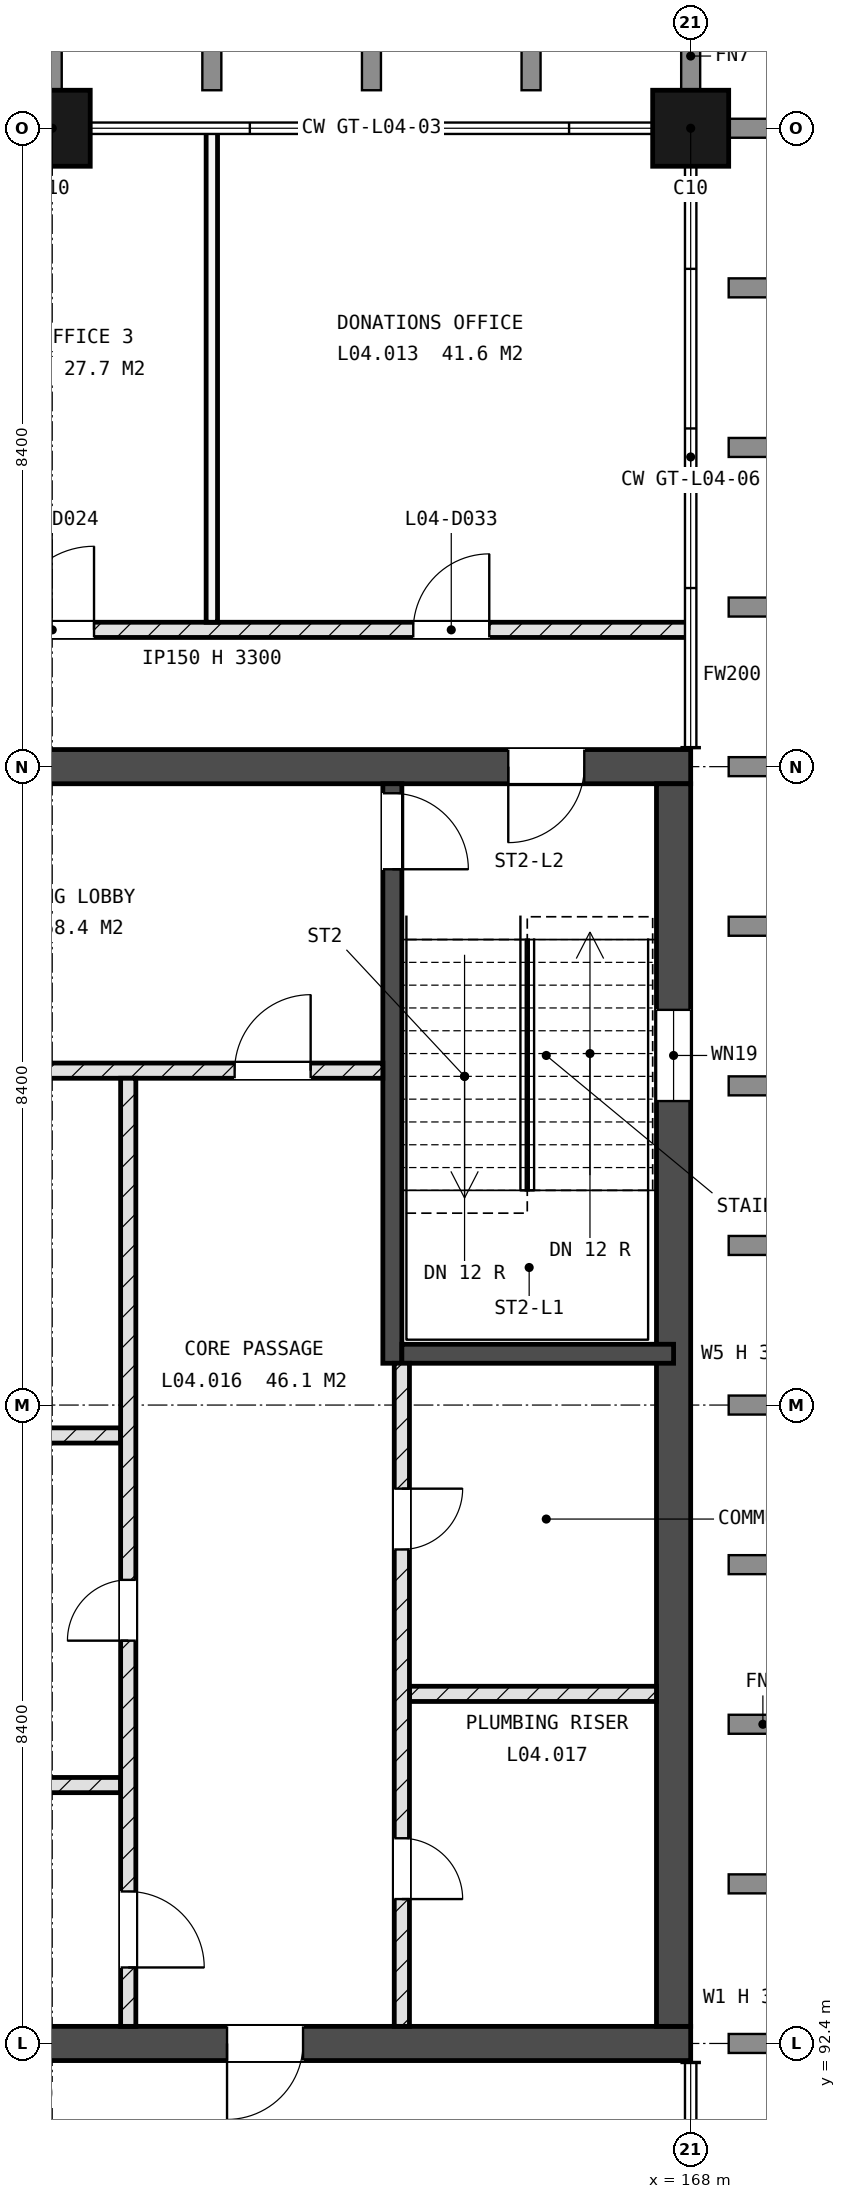
"""IFC4 building model, lengths in metres.
Left out: names, types, materials, properties, quantities, classifications, styles, units other than length and angle.
Written with IfcOpenShell. Run it as: python <this file> out.ifc"""

import sys

from ifc_helpers import new_model, si_unit, direction, frame, frame_2d, origin, origin_2d, place, context, subcontext, project, spatial, rectangle, extrude, element, fill, save


model = new_model("IFC4")
c1 = context("Model", 3, precision=1e-05, world=origin(), true_north=direction((0.0, 1.0)))
c2 = subcontext(c1, "Body", "Model", "MODEL_VIEW")
j1 = project(units=[si_unit("LENGTHUNIT", "METRE"), si_unit("PLANEANGLEUNIT", "RADIAN")], contexts=[c1])
p1 = place(None, origin())
s1 = spatial("IfcSite", under=j1, at=p1, CompositionType="ELEMENT")
p2 = place(p1, origin())
s2 = spatial("IfcBuilding", under=s1, at=p2, CompositionType="ELEMENT")
p3 = place(p2, frame((0.0, 0.0, 18.0)))
s3 = spatial("IfcBuildingStorey", under=s2, at=p3, CompositionType="ELEMENT", Elevation=18.0)
for number, where, z_axis, x_axis in (
    (1, (159.6, 117.6, -0.25), (0.0, 0.0, 1.0), (1.0, 0.0, 0.0)),
    (2, (168.0, 117.6, -0.25), (0.0, 0.0, 1.0), (1.0, 0.0, 0.0)),
):
    element("IfcColumn", number, at=place(p3, frame(where, z_axis=z_axis, x_axis=x_axis)), inside=s3, PredefinedType="COLUMN", context=c2, shape_type="SweptSolid", body=[
        extrude(rectangle(XDim=1.0, YDim=1.0, at=origin_2d()), origin(), (0.0, 0.0, 1.0), 3.6),
    ])
p4 = place(p3, frame((142.8, 92.4, -0.25), z_axis=(0.0, 0.0, 1.0), x_axis=(1.0, 0.0, 0.0)))
e3 = element("IfcWall", 3, at=p4, inside=s3, PredefinedType="SHEAR", context=c2, shape_type="SweptSolid", body=[
    extrude(rectangle(XDim=25.2, YDim=0.45, at=frame_2d((12.6, 0.0))), origin(), (0.0, 0.0, 1.0), 3.6),
])
p5 = place(p4, frame((1.4, 0.0, 0.25)))
e4 = element("IfcOpeningElement", 4, at=p5, cuts=e3, PredefinedType="OPENING", context=c2, shape_type="SweptSolid", body=[
    extrude(rectangle(XDim=1.0, YDim=2.1, at=frame_2d((0.5, 1.05))), frame((0.0, 0.235, 0.0), z_axis=(0.0, -1.0, 0.0), x_axis=(1.0, 0.0, 0.0)), (0.0, 0.0, 1.0), 0.47),
])
p6 = place(p4, frame((19.1, 0.0, 0.25)))
e5 = element("IfcOpeningElement", 5, at=p6, cuts=e3, PredefinedType="OPENING", context=c2, shape_type="SweptSolid", body=[
    extrude(rectangle(XDim=1.0, YDim=2.1, at=frame_2d((0.5, 1.05))), frame((0.0, 0.235, 0.0), z_axis=(0.0, -1.0, 0.0), x_axis=(1.0, 0.0, 0.0)), (0.0, 0.0, 1.0), 0.47),
])
p7 = place(p4, frame((10.4, 0.0, 0.25)))
e6 = element("IfcOpeningElement", 6, at=p7, cuts=e3, PredefinedType="OPENING", context=c2, shape_type="SweptSolid", body=[
    extrude(rectangle(XDim=1.0, YDim=2.1, at=frame_2d((0.5, 1.05))), frame((0.0, 0.235, 0.0), z_axis=(0.0, -1.0, 0.0), x_axis=(1.0, 0.0, 0.0)), (0.0, 0.0, 1.0), 0.47),
])
p8 = place(p3, frame((142.8, 109.2, -0.25), z_axis=(0.0, 0.0, 1.0), x_axis=(1.0, 0.0, 0.0)))
e7 = element("IfcWall", 7, at=p8, inside=s3, PredefinedType="SHEAR", context=c2, shape_type="SweptSolid", body=[
    extrude(rectangle(XDim=25.2, YDim=0.45, at=frame_2d((12.6, 0.0))), origin(), (0.0, 0.0, 1.0), 3.6),
])
p9 = place(p8, frame((22.8, 0.0, 0.25)))
e8 = element("IfcOpeningElement", 8, at=p9, cuts=e7, PredefinedType="OPENING", context=c2, shape_type="SweptSolid", body=[
    extrude(rectangle(XDim=1.0, YDim=2.1, at=frame_2d((0.5, 1.05))), frame((0.0, 0.235, 0.0), z_axis=(0.0, -1.0, 0.0), x_axis=(1.0, 0.0, 0.0)), (0.0, 0.0, 1.0), 0.47),
])
p10 = place(p8, frame((1.5, 0.0, 0.25)))
e9 = element("IfcOpeningElement", 9, at=p10, cuts=e7, PredefinedType="OPENING", context=c2, shape_type="SweptSolid", body=[
    extrude(rectangle(XDim=0.8, YDim=2.1, at=frame_2d((0.4, 1.05))), frame((0.0, 0.235, 0.0), z_axis=(0.0, -1.0, 0.0), x_axis=(1.0, 0.0, 0.0)), (0.0, 0.0, 1.0), 0.47),
])
p11 = place(p8, frame((13.4, 0.0, 0.25)))
e10 = element("IfcOpeningElement", 10, at=p11, cuts=e7, PredefinedType="OPENING", context=c2, shape_type="SweptSolid", body=[
    extrude(rectangle(XDim=1.0, YDim=2.1, at=frame_2d((0.5, 1.05))), frame((0.0, 0.235, 0.0), z_axis=(0.0, -1.0, 0.0), x_axis=(1.0, 0.0, 0.0)), (0.0, 0.0, 1.0), 0.47),
])
p12 = place(p3, frame((167.775, 92.625, -0.25), z_axis=(0.0, 0.0, 1.0), x_axis=(0.0, 1.0, 0.0)))
e11 = element("IfcWall", 11, at=p12, inside=s3, PredefinedType="SHEAR", context=c2, shape_type="SweptSolid", body=[
    extrude(rectangle(XDim=16.35, YDim=0.45, at=frame_2d((8.175, 0.0))), origin(), (0.0, 0.0, 1.0), 3.6),
])
p13 = place(p12, frame((12.175, 0.0, 1.85)))
e12 = element("IfcOpeningElement", 12, at=p13, cuts=e11, PredefinedType="OPENING", context=c2, shape_type="SweptSolid", body=[
    extrude(rectangle(XDim=1.2, YDim=0.9, at=frame_2d((0.6, 0.45))), frame((0.0, 0.235, 0.0), z_axis=(0.0, -1.0, 0.0), x_axis=(1.0, 0.0, 0.0)), (0.0, 0.0, 1.0), 0.47),
])
p14 = place(p3, frame((164.075, 101.35, -0.25), z_axis=(0.0, 0.0, 1.0), x_axis=(0.0, 1.0, 0.0)))
e13 = element("IfcWall", 13, at=p14, inside=s3, PredefinedType="SHEAR", context=c2, shape_type="SweptSolid", body=[
    extrude(rectangle(XDim=7.625, YDim=0.25, at=frame_2d((3.812, 0.0))), origin(), (0.0, 0.0, 1.0), 3.6),
])
p15 = place(p14, frame((6.5, 0.0, 0.25)))
e14 = element("IfcOpeningElement", 14, at=p15, cuts=e13, PredefinedType="OPENING", context=c2, shape_type="SweptSolid", body=[
    extrude(rectangle(XDim=1.0, YDim=2.1, at=frame_2d((0.5, 1.05))), frame((0.0, 0.135, 0.0), z_axis=(0.0, -1.0, 0.0), x_axis=(1.0, 0.0, 0.0)), (0.0, 0.0, 1.0), 0.27),
])
p16 = place(p3, frame((164.2, 101.475, -0.25), z_axis=(0.0, 0.0, 1.0), x_axis=(1.0, 0.0, 0.0)))
e15 = element("IfcWall", 15, at=p16, inside=s3, PredefinedType="SHEAR", context=c2, shape_type="SweptSolid", body=[
    extrude(rectangle(XDim=3.575, YDim=0.25, at=frame_2d((1.788, 0.0))), origin(), (0.0, 0.0, 1.0), 3.6),
])
p17 = place(p3, frame((158.25, 95.8, 0.0), z_axis=(0.0, 0.0, 1.0), x_axis=(1.0, 0.0, 0.0)))
e16 = element("IfcWall", 16, at=p17, inside=s3, PredefinedType="SOLIDWALL", context=c2, shape_type="SweptSolid", body=[
    extrude(rectangle(XDim=2.25, YDim=0.2, at=frame_2d((1.125, 0.0))), origin(), (0.0, 0.0, 1.0), 3.3),
])
p18 = place(p3, frame((164.3, 97.0, 0.0), z_axis=(0.0, 0.0, 1.0), x_axis=(1.0, 0.0, 0.0)))
e17 = element("IfcWall", 17, at=p18, inside=s3, PredefinedType="SOLIDWALL", context=c2, shape_type="SweptSolid", body=[
    extrude(rectangle(XDim=3.25, YDim=0.2, at=frame_2d((1.625, 0.0))), origin(), (0.0, 0.0, 1.0), 3.3),
])
p19 = place(p3, frame((146.5, 100.4, 0.0), z_axis=(0.0, 0.0, 1.0), x_axis=(1.0, 0.0, 0.0)))
e18 = element("IfcWall", 18, at=p19, inside=s3, PredefinedType="SOLIDWALL", context=c2, shape_type="SweptSolid", body=[
    extrude(rectangle(XDim=14.0, YDim=0.2, at=frame_2d((7.0, 0.0))), origin(), (0.0, 0.0, 1.0), 3.3),
])
p20 = place(p3, frame((143.25, 105.2, 0.0), z_axis=(0.0, 0.0, 1.0), x_axis=(1.0, 0.0, 0.0)))
e19 = element("IfcWall", 19, at=p20, inside=s3, PredefinedType="SOLIDWALL", context=c2, shape_type="SweptSolid", body=[
    extrude(rectangle(XDim=20.7, YDim=0.2, at=frame_2d((10.35, 0.0))), origin(), (0.0, 0.0, 1.0), 3.3),
])
p21 = place(p20, frame((11.45, 0.0, 0.0)))
e20 = element("IfcOpeningElement", 20, at=p21, cuts=e19, PredefinedType="OPENING", context=c2, shape_type="SweptSolid", body=[
    extrude(rectangle(XDim=0.8, YDim=2.1, at=frame_2d((0.4, 1.05))), frame((0.0, 0.11, 0.0), z_axis=(0.0, -1.0, 0.0), x_axis=(1.0, 0.0, 0.0)), (0.0, 0.0, 1.0), 0.22),
])
p22 = place(p20, frame((18.75, 0.0, 0.0)))
e21 = element("IfcOpeningElement", 21, at=p22, cuts=e19, PredefinedType="OPENING", context=c2, shape_type="SweptSolid", body=[
    extrude(rectangle(XDim=1.0, YDim=2.1, at=frame_2d((0.5, 1.05))), frame((0.0, 0.11, 0.0), z_axis=(0.0, -1.0, 0.0), x_axis=(1.0, 0.0, 0.0)), (0.0, 0.0, 1.0), 0.22),
])
p23 = place(p3, frame((142.8, 111.0, 0.0), z_axis=(0.0, 0.0, 1.0), x_axis=(1.0, 0.0, 0.0)))
e22 = element("IfcWall", 22, at=p23, inside=s3, PredefinedType="SOLIDWALL", context=c2, shape_type="SweptSolid", body=[
    extrude(rectangle(XDim=25.2, YDim=0.2, at=frame_2d((12.6, 0.0))), origin(), (0.0, 0.0, 1.0), 3.3),
])
p24 = place(p23, frame((1.55, 0.0, 0.0)))
e23 = element("IfcOpeningElement", 23, at=p24, cuts=e22, PredefinedType="OPENING", context=c2, shape_type="SweptSolid", body=[
    extrude(rectangle(XDim=1.1, YDim=2.25, at=frame_2d((0.55, 1.125))), frame((0.0, 0.11, 0.0), z_axis=(0.0, -1.0, 0.0), x_axis=(1.0, 0.0, 0.0)), (0.0, 0.0, 1.0), 0.22),
])
p25 = place(p23, frame((6.85, 0.0, 0.0)))
e24 = element("IfcOpeningElement", 24, at=p25, cuts=e22, PredefinedType="OPENING", context=c2, shape_type="SweptSolid", body=[
    extrude(rectangle(XDim=1.0, YDim=2.1, at=frame_2d((0.5, 1.05))), frame((0.0, 0.11, 0.0), z_axis=(0.0, -1.0, 0.0), x_axis=(1.0, 0.0, 0.0)), (0.0, 0.0, 1.0), 0.22),
])
p26 = place(p23, frame((12.05, 0.0, 0.0)))
e25 = element("IfcOpeningElement", 25, at=p26, cuts=e22, PredefinedType="OPENING", context=c2, shape_type="SweptSolid", body=[
    extrude(rectangle(XDim=1.1, YDim=2.25, at=frame_2d((0.55, 1.125))), frame((0.0, 0.11, 0.0), z_axis=(0.0, -1.0, 0.0), x_axis=(1.0, 0.0, 0.0)), (0.0, 0.0, 1.0), 0.22),
])
p27 = place(p23, frame((16.25, 0.0, 0.0)))
e26 = element("IfcOpeningElement", 26, at=p27, cuts=e22, PredefinedType="OPENING", context=c2, shape_type="SweptSolid", body=[
    extrude(rectangle(XDim=1.1, YDim=2.25, at=frame_2d((0.55, 1.125))), frame((0.0, 0.11, 0.0), z_axis=(0.0, -1.0, 0.0), x_axis=(1.0, 0.0, 0.0)), (0.0, 0.0, 1.0), 0.22),
])
p28 = place(p23, frame((21.55, 0.0, 0.0)))
e27 = element("IfcOpeningElement", 27, at=p28, cuts=e22, PredefinedType="OPENING", context=c2, shape_type="SweptSolid", body=[
    extrude(rectangle(XDim=1.0, YDim=2.1, at=frame_2d((0.5, 1.05))), frame((0.0, 0.11, 0.0), z_axis=(0.0, -1.0, 0.0), x_axis=(1.0, 0.0, 0.0)), (0.0, 0.0, 1.0), 0.22),
])
p29 = place(p3, frame((160.6, 92.625, 0.0), z_axis=(0.0, 0.0, 1.0), x_axis=(0.0, 1.0, 0.0)))
e28 = element("IfcWall", 28, at=p29, inside=s3, PredefinedType="SOLIDWALL", context=c2, shape_type="SweptSolid", body=[
    extrude(rectangle(XDim=12.475, YDim=0.2, at=frame_2d((6.238, 0.0))), origin(), (0.0, 0.0, 1.0), 3.3),
])
p30 = place(p29, frame((5.075, 0.0, 0.0)))
e29 = element("IfcOpeningElement", 29, at=p30, cuts=e28, PredefinedType="OPENING", context=c2, shape_type="SweptSolid", body=[
    extrude(rectangle(XDim=0.8, YDim=2.1, at=frame_2d((0.4, 1.05))), frame((0.0, 0.11, 0.0), z_axis=(0.0, -1.0, 0.0), x_axis=(1.0, 0.0, 0.0)), (0.0, 0.0, 1.0), 0.22),
])
p31 = place(p29, frame((0.775, 0.0, 0.0)))
e30 = element("IfcOpeningElement", 30, at=p31, cuts=e28, PredefinedType="OPENING", context=c2, shape_type="SweptSolid", body=[
    extrude(rectangle(XDim=1.0, YDim=2.1, at=frame_2d((0.5, 1.05))), frame((0.0, 0.11, 0.0), z_axis=(0.0, -1.0, 0.0), x_axis=(1.0, 0.0, 0.0)), (0.0, 0.0, 1.0), 0.22),
])
p32 = place(p3, frame((161.7, 111.1, 0.0), z_axis=(0.0, 0.0, 1.0), x_axis=(0.0, 1.0, 0.0)))
e31 = element("IfcWall", 31, at=p32, inside=s3, PredefinedType="PARTITIONING", context=c2, shape_type="SweptSolid", body=[
    extrude(rectangle(XDim=6.5, YDim=0.15, at=frame_2d((3.25, 0.0))), origin(), (0.0, 0.0, 1.0), 3.3),
])
p33 = place(p3, frame((164.2, 92.625, 0.0), z_axis=(0.0, 0.0, 1.0), x_axis=(0.0, 1.0, 0.0)))
e32 = element("IfcWall", 32, at=p33, inside=s3, PredefinedType="SOLIDWALL", context=c2, shape_type="SweptSolid", body=[
    extrude(rectangle(XDim=8.725, YDim=0.2, at=frame_2d((4.363, 0.0))), origin(), (0.0, 0.0, 1.0), 3.3),
])
p34 = place(p33, frame((1.675, 0.0, 0.0)))
e33 = element("IfcOpeningElement", 33, at=p34, cuts=e32, PredefinedType="OPENING", context=c2, shape_type="SweptSolid", body=[
    extrude(rectangle(XDim=0.8, YDim=2.1, at=frame_2d((0.4, 1.05))), frame((0.0, 0.11, 0.0), z_axis=(0.0, -1.0, 0.0), x_axis=(1.0, 0.0, 0.0)), (0.0, 0.0, 1.0), 0.22),
])
p35 = place(p33, frame((6.275, 0.0, 0.0)))
e34 = element("IfcOpeningElement", 34, at=p35, cuts=e32, PredefinedType="OPENING", context=c2, shape_type="SweptSolid", body=[
    extrude(rectangle(XDim=0.8, YDim=2.1, at=frame_2d((0.4, 1.05))), frame((0.0, 0.11, 0.0), z_axis=(0.0, -1.0, 0.0), x_axis=(1.0, 0.0, 0.0)), (0.0, 0.0, 1.0), 0.22),
])
p36 = place(p13, origin())
e35 = element("IfcWindow", 35, at=p36, inside=s3, PartitioningType="SINGLE_PANEL", PredefinedType="WINDOW", context=c2, shape_type="SweptSolid", body=[
    extrude(rectangle(XDim=1.2, YDim=0.9, at=frame_2d((0.6, 0.45))), frame((0.0, 0.03, 0.0), z_axis=(0.0, -1.0, 0.0), x_axis=(1.0, 0.0, 0.0)), (0.0, 0.0, 1.0), 0.06),
])
fill(e12, e35)
p37 = place(p15, origin())
e36 = element("IfcDoor", 36, at=p37, inside=s3, OperationType="SINGLE_SWING_LEFT", PredefinedType="DOOR", context=c2, shape_type="SweptSolid", body=[
    extrude(rectangle(XDim=1.0, YDim=2.1, at=frame_2d((0.5, 1.05))), frame((0.0, 0.025, 0.0), z_axis=(0.0, -1.0, 0.0), x_axis=(1.0, 0.0, 0.0)), (0.0, 0.0, 1.0), 0.05),
])
fill(e14, e36)
p38 = place(p9, origin())
e37 = element("IfcDoor", 37, at=p38, inside=s3, OperationType="SINGLE_SWING_LEFT", PredefinedType="DOOR", context=c2, shape_type="SweptSolid", body=[
    extrude(rectangle(XDim=1.0, YDim=2.1, at=frame_2d((0.5, 1.05))), frame((0.0, 0.025, 0.0), z_axis=(0.0, -1.0, 0.0), x_axis=(1.0, 0.0, 0.0)), (0.0, 0.0, 1.0), 0.05),
])
fill(e8, e37)
p39 = place(p27, origin())
e38 = element("IfcDoor", 38, at=p39, inside=s3, OperationType="SINGLE_SWING_LEFT", PredefinedType="DOOR", context=c2, shape_type="SweptSolid", body=[
    extrude(rectangle(XDim=1.1, YDim=2.25, at=frame_2d((0.55, 1.125))), frame((0.0, 0.025, 0.0), z_axis=(0.0, -1.0, 0.0), x_axis=(1.0, 0.0, 0.0)), (0.0, 0.0, 1.0), 0.05),
])
fill(e26, e38)
p40 = place(p28, origin())
e39 = element("IfcDoor", 39, at=p40, inside=s3, OperationType="SINGLE_SWING_LEFT", PredefinedType="DOOR", context=c2, shape_type="SweptSolid", body=[
    extrude(rectangle(XDim=1.0, YDim=2.1, at=frame_2d((0.5, 1.05))), frame((0.0, 0.025, 0.0), z_axis=(0.0, -1.0, 0.0), x_axis=(1.0, 0.0, 0.0)), (0.0, 0.0, 1.0), 0.05),
])
fill(e27, e39)
p41 = place(p34, origin())
e40 = element("IfcDoor", 40, at=p41, inside=s3, OperationType="SINGLE_SWING_LEFT", PredefinedType="DOOR", context=c2, shape_type="SweptSolid", body=[
    extrude(rectangle(XDim=0.8, YDim=2.1, at=frame_2d((0.4, 1.05))), frame((0.0, 0.025, 0.0), z_axis=(0.0, -1.0, 0.0), x_axis=(1.0, 0.0, 0.0)), (0.0, 0.0, 1.0), 0.05),
])
fill(e33, e40)
p42 = place(p35, origin())
e41 = element("IfcDoor", 41, at=p42, inside=s3, OperationType="SINGLE_SWING_RIGHT", PredefinedType="DOOR", context=c2, shape_type="SweptSolid", body=[
    extrude(rectangle(XDim=0.8, YDim=2.1, at=frame_2d((0.4, 1.05))), frame((0.0, 0.025, 0.0), z_axis=(0.0, -1.0, 0.0), x_axis=(1.0, 0.0, 0.0)), (0.0, 0.0, 1.0), 0.05),
])
fill(e34, e41)
p43 = place(p30, origin())
e42 = element("IfcDoor", 42, at=p43, inside=s3, OperationType="SINGLE_SWING_RIGHT", PredefinedType="DOOR", context=c2, shape_type="SweptSolid", body=[
    extrude(rectangle(XDim=0.8, YDim=2.1, at=frame_2d((0.4, 1.05))), frame((0.0, 0.025, 0.0), z_axis=(0.0, -1.0, 0.0), x_axis=(1.0, 0.0, 0.0)), (0.0, 0.0, 1.0), 0.05),
])
fill(e29, e42)
p44 = place(p6, origin())
e43 = element("IfcDoor", 43, at=p44, inside=s3, OperationType="SINGLE_SWING_LEFT", PredefinedType="DOOR", context=c2, shape_type="SweptSolid", body=[
    extrude(rectangle(XDim=1.0, YDim=2.1, at=frame_2d((0.5, 1.05))), frame((0.0, 0.025, 0.0), z_axis=(0.0, -1.0, 0.0), x_axis=(1.0, 0.0, 0.0)), (0.0, 0.0, 1.0), 0.05),
])
fill(e5, e43)
p45 = place(p31, origin())
e44 = element("IfcDoor", 44, at=p45, inside=s3, OperationType="SINGLE_SWING_LEFT", PredefinedType="DOOR", context=c2, shape_type="SweptSolid", body=[
    extrude(rectangle(XDim=1.0, YDim=2.1, at=frame_2d((0.5, 1.05))), frame((0.0, 0.025, 0.0), z_axis=(0.0, -1.0, 0.0), x_axis=(1.0, 0.0, 0.0)), (0.0, 0.0, 1.0), 0.05),
])
fill(e30, e44)
p46 = place(p22, origin())
e45 = element("IfcDoor", 45, at=p46, inside=s3, OperationType="SINGLE_SWING_LEFT", PredefinedType="DOOR", context=c2, shape_type="SweptSolid", body=[
    extrude(rectangle(XDim=1.0, YDim=2.1, at=frame_2d((0.5, 1.05))), frame((0.0, 0.025, 0.0), z_axis=(0.0, -1.0, 0.0), x_axis=(1.0, 0.0, 0.0)), (0.0, 0.0, 1.0), 0.05),
])
fill(e21, e45)
save(model, sys.argv[1])
